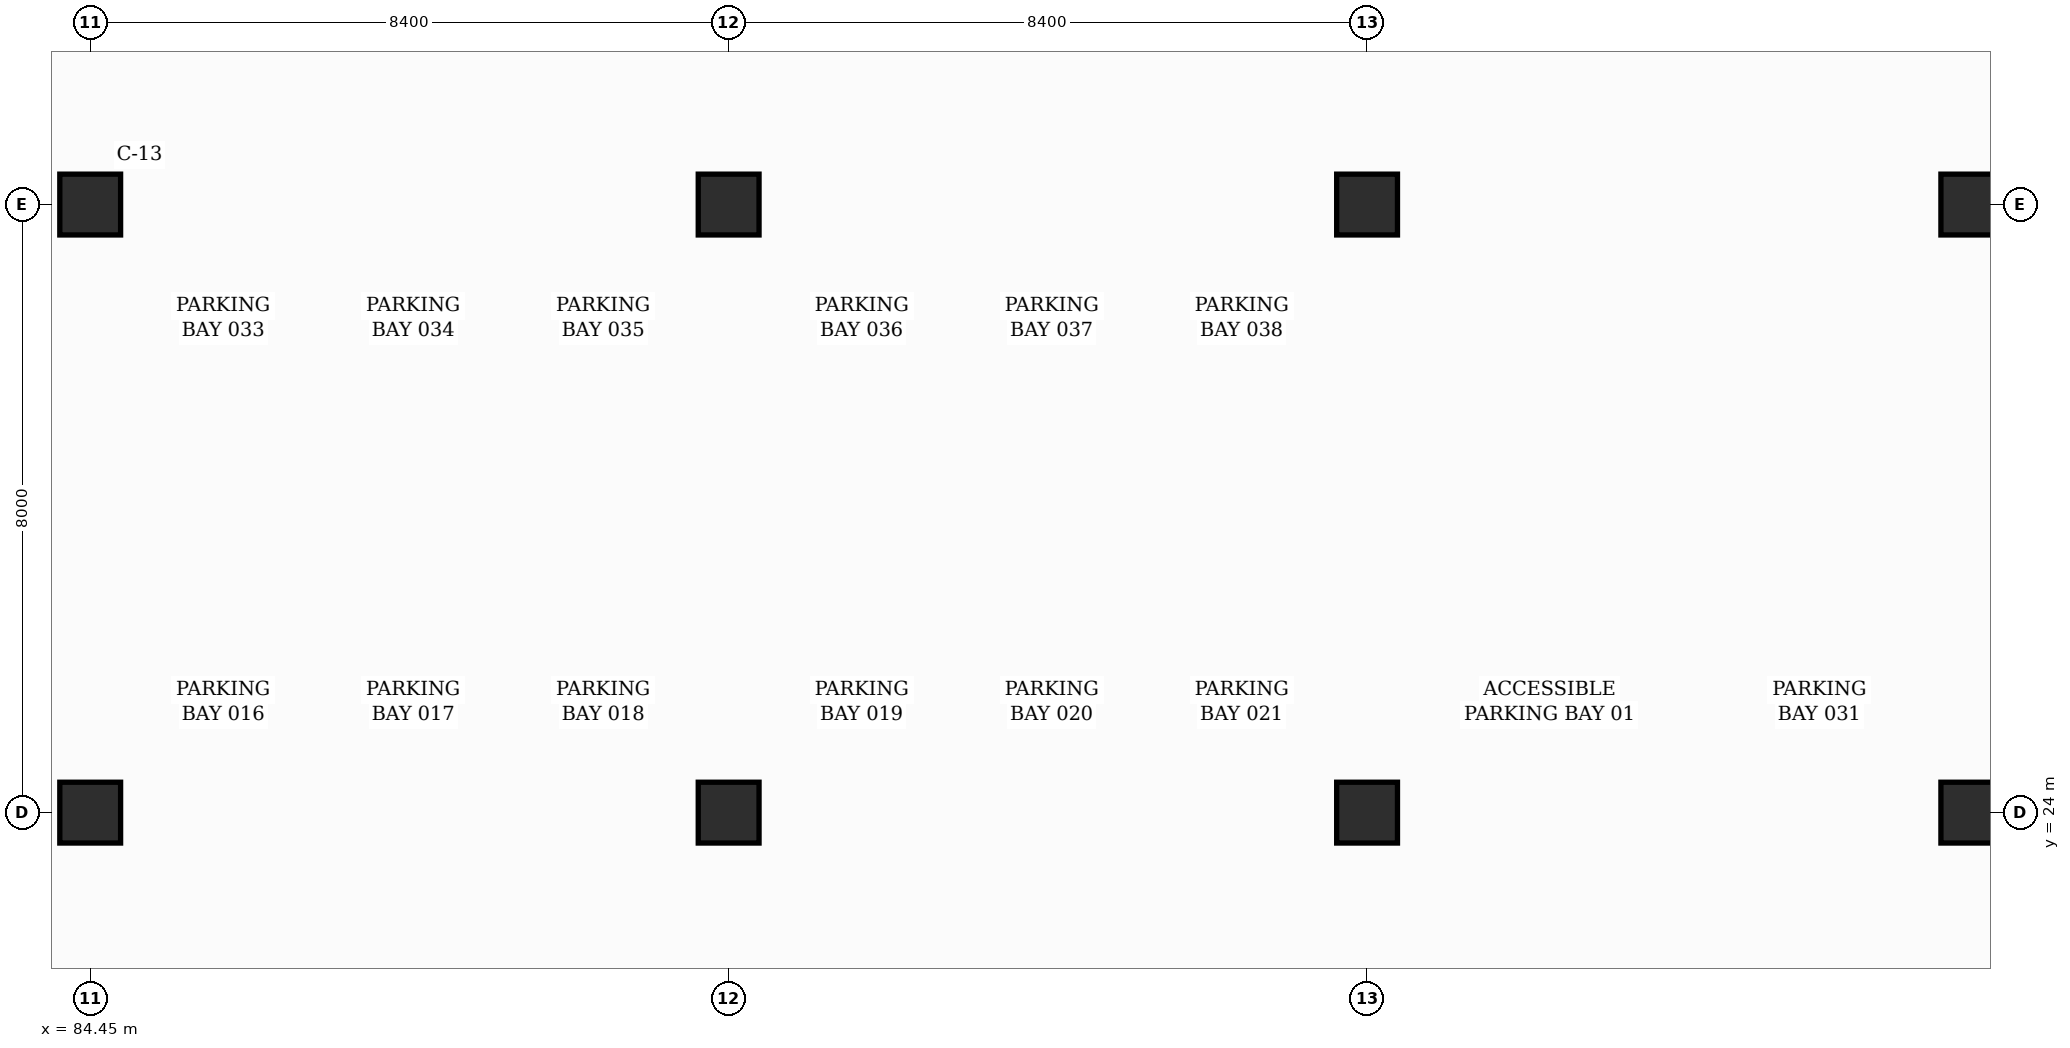
"""IFC4 building model, lengths in metres.
Left out: names, types, materials, properties, quantities, classifications, styles, units other than length and angle.
Written with IfcOpenShell. Run it as: python <this file> out.ifc"""

import sys

from ifc_helpers import new_model, si_unit, direction, frame, origin, origin_2d, place, context, subcontext, project, spatial, rectangle, hollow_rectangle, extrude, element, save


model = new_model("IFC4")
c1 = context("Model", 3, precision=1e-05, world=origin(), true_north=direction((0.0, 1.0)))
c2 = subcontext(c1, "Body", "Model", "MODEL_VIEW")
j1 = project(units=[si_unit("LENGTHUNIT", "METRE"), si_unit("PLANEANGLEUNIT", "RADIAN")], contexts=[c1])
p1 = place(None, origin())
s1 = spatial("IfcSite", under=j1, at=p1, CompositionType="ELEMENT")
p2 = place(p1, origin())
s2 = spatial("IfcBuilding", under=s1, at=p2, CompositionType="ELEMENT")
p3 = place(p2, frame((0.0, 0.0, -5.4)))
s3 = spatial("IfcBuildingStorey", under=s2, at=p3, CompositionType="ELEMENT", Elevation=-5.4)
p4 = place(p3, frame((84.45, 24.0, 0.0), z_axis=(0.0, 0.0, 1.0), x_axis=(1.0, 0.0, 0.0)))
e1 = element("IfcColumn", 1, at=p4, inside=s3, PredefinedType="COLUMN", context=c2, shape_type="SweptSolid", body=[
    extrude(hollow_rectangle(XDim=0.8, YDim=0.8, WallThickness=0.032, InnerFilletRadius=0.032, OuterFilletRadius=0.064, at=origin_2d()), origin(), (0.0, 0.0, 1.0), 5.4),
])
p5 = place(p3, frame((84.45, 32.0, 0.0), z_axis=(0.0, 0.0, 1.0), x_axis=(1.0, 0.0, 0.0)))
e2 = element("IfcColumn", 2, at=p5, inside=s3, PredefinedType="COLUMN", context=c2, shape_type="SweptSolid", body=[
    extrude(rectangle(XDim=0.8, YDim=0.8, at=origin_2d()), origin(), (0.0, 0.0, 1.0), 5.12),
])
for number, where, z_axis, x_axis in (
    (3, (92.85, 24.0, 0.0), (0.0, 0.0, 1.0), (1.0, 0.0, 0.0)),
    (4, (92.85, 32.0, 0.0), (0.0, 0.0, 1.0), (1.0, 0.0, 0.0)),
    (5, (101.25, 24.0, 0.0), (0.0, 0.0, 1.0), (1.0, 0.0, 0.0)),
    (6, (101.25, 32.0, 0.0), (0.0, 0.0, 1.0), (1.0, 0.0, 0.0)),
    (7, (109.2, 24.0, 0.0), (0.0, 0.0, 1.0), (1.0, 0.0, 0.0)),
    (8, (109.2, 32.0, 0.0), (0.0, 0.0, 1.0), (1.0, 0.0, 0.0)),
):
    element("IfcColumn", number, at=place(p3, frame(where, z_axis=z_axis, x_axis=x_axis)), inside=s3, PredefinedType="COLUMN", context=c2, shape_type="SweptSolid", body=[
        extrude(hollow_rectangle(XDim=0.8, YDim=0.8, WallThickness=0.032, InnerFilletRadius=0.032, OuterFilletRadius=0.064, at=origin_2d()), origin(), (0.0, 0.0, 1.0), 5.4),
    ])
save(model, sys.argv[1])
